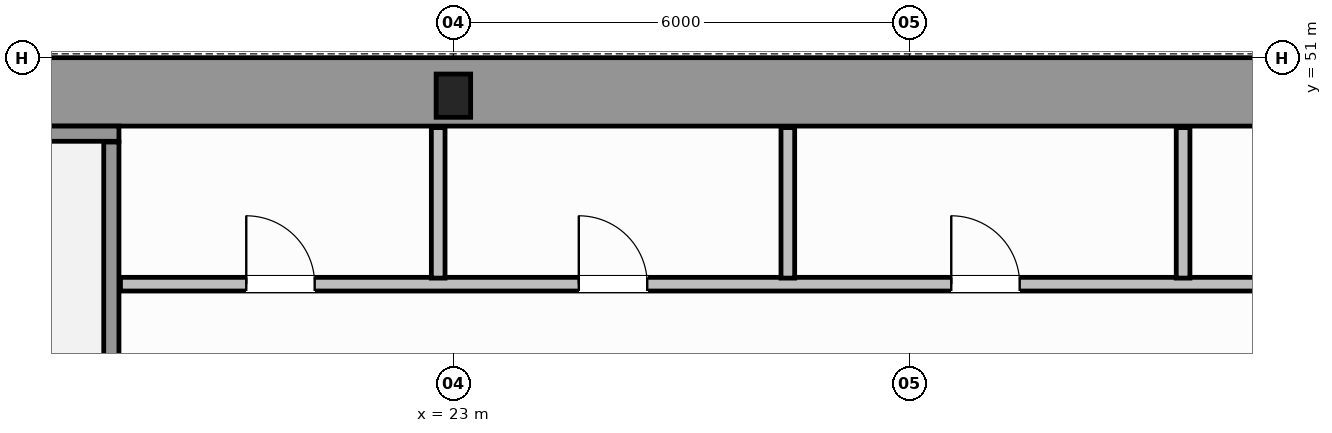
"""IFC4 building model, lengths in metres.
Left out: names, types, materials, properties, quantities, classifications, styles, units other than length and angle.
Written with IfcOpenShell. Run it as: python <this file> out.ifc"""

import sys

from ifc_helpers import new_model, si_unit, direction, frame, frame_2d, origin, origin_2d, place, context, subcontext, project, spatial, rectangle, i_section, extrude, source, transform, mapped, element, fill, save


model = new_model("IFC4")
c1 = context("Model", 3, precision=1e-05, world=origin(), true_north=direction((0.0, 1.0)))
c2 = subcontext(c1, "Body", "Model", "MODEL_VIEW")
j1 = project(units=[si_unit("LENGTHUNIT", "METRE"), si_unit("PLANEANGLEUNIT", "RADIAN")], contexts=[c1])
p1 = place(None, origin())
s1 = spatial("IfcSite", under=j1, at=p1, CompositionType="ELEMENT")
p2 = place(p1, origin())
s2 = spatial("IfcBuilding", under=s1, at=p2, CompositionType="ELEMENT")
p3 = place(p2, frame((0.0, 0.0, 49.2)))
s3 = spatial("IfcBuildingStorey", under=s2, at=p3, CompositionType="ELEMENT", Elevation=49.2)
m1 = source(origin(), c2, "Body", "SweptSolid", [
    extrude(i_section(OverallWidth=0.454, OverallDepth=0.569, WebThickness=0.078, FlangeThickness=0.08, FilletRadius=0.015, at=origin_2d()), origin(), (0.0, 0.0, 1.0), 3.8),
])
p4 = place(p3, frame((23.0, 50.5, 0.0), z_axis=(0.0, 0.0, 1.0), x_axis=(1.0, 0.0, 0.0)))
e1 = element("IfcColumn", 1, at=p4, inside=s3, PredefinedType="COLUMN", context=c2, shape_type="MappedRepresentation", body=[
    mapped(m1, transform((0.0, 0.0, 0.0), scale=1.0)),
])
p5 = place(p3, frame((14.454, 50.55, 0.0), z_axis=(0.0, 0.0, 1.0), x_axis=(1.0, 0.0, 0.0)))
e2 = element("IfcWall", 2, at=p5, inside=s3, PredefinedType="SHEAR", context=c2, shape_type="SweptSolid", body=[
    extrude(rectangle(XDim=19.544, YDim=0.9, at=frame_2d((9.772, 0.0))), origin(), (0.0, 0.0, 1.0), 3.8),
])
p6 = place(p3, frame((14.45, 50.0, 0.0), z_axis=(0.0, 0.0, 1.0), x_axis=(1.0, 0.0, 0.0)))
e3 = element("IfcWall", 3, at=p6, inside=s3, PredefinedType="SOLIDWALL", context=c2, shape_type="SweptSolid", body=[
    extrude(rectangle(XDim=4.15, YDim=0.2, at=frame_2d((2.075, 0.0))), origin(), (0.0, 0.0, 1.0), 3.8),
])
p7 = place(p3, frame((18.5, 39.96, 0.0), z_axis=(0.0, 0.0, 1.0), x_axis=(0.0, 1.0, 0.0)))
e4 = element("IfcWall", 4, at=p7, inside=s3, PredefinedType="SOLIDWALL", context=c2, shape_type="SweptSolid", body=[
    extrude(rectangle(XDim=9.93, YDim=0.2, at=frame_2d((4.965, 0.0))), origin(), (0.0, 0.0, 1.0), 3.8),
])
p8 = place(p3, frame((18.62, 48.02, 0.0), z_axis=(0.0, 0.0, 1.0), x_axis=(1.0, 0.0, 0.0)))
e5 = element("IfcWall", 5, at=p8, inside=s3, PredefinedType="PLUMBINGWALL", context=c2, shape_type="SweptSolid", body=[
    extrude(rectangle(XDim=30.76, YDim=0.18, at=frame_2d((15.38, 0.0))), origin(), (0.0, 0.0, 1.0), 3.58),
])
p9 = place(p8, frame((1.655, 0.0, 0.0)))
e6 = element("IfcOpeningElement", 6, at=p9, cuts=e5, PredefinedType="OPENING", context=c2, shape_type="SweptSolid", body=[
    extrude(rectangle(XDim=0.9, YDim=2.15, at=frame_2d((0.45, 1.075))), frame((0.0, 0.1, 0.0), z_axis=(0.0, -1.0, 0.0), x_axis=(1.0, 0.0, 0.0)), (0.0, 0.0, 1.0), 0.2),
])
p10 = place(p8, frame((6.03, 0.0, 0.0)))
e7 = element("IfcOpeningElement", 7, at=p10, cuts=e5, PredefinedType="OPENING", context=c2, shape_type="SweptSolid", body=[
    extrude(rectangle(XDim=0.9, YDim=2.15, at=frame_2d((0.45, 1.075))), frame((0.0, 0.1, 0.0), z_axis=(0.0, -1.0, 0.0), x_axis=(1.0, 0.0, 0.0)), (0.0, 0.0, 1.0), 0.2),
])
p11 = place(p8, frame((10.93, 0.0, 0.0)))
e8 = element("IfcOpeningElement", 8, at=p11, cuts=e5, PredefinedType="OPENING", context=c2, shape_type="SweptSolid", body=[
    extrude(rectangle(XDim=0.9, YDim=2.15, at=frame_2d((0.45, 1.075))), frame((0.0, 0.1, 0.0), z_axis=(0.0, -1.0, 0.0), x_axis=(1.0, 0.0, 0.0)), (0.0, 0.0, 1.0), 0.2),
])
p12 = place(p8, frame((16.13, 0.0, 0.0)))
e9 = element("IfcOpeningElement", 9, at=p12, cuts=e5, PredefinedType="OPENING", context=c2, shape_type="SweptSolid", body=[
    extrude(rectangle(XDim=0.9, YDim=2.15, at=frame_2d((0.45, 1.075))), frame((0.0, 0.1, 0.0), z_axis=(0.0, -1.0, 0.0), x_axis=(1.0, 0.0, 0.0)), (0.0, 0.0, 1.0), 0.2),
])
p13 = place(p8, frame((21.73, 0.0, 0.0)))
e10 = element("IfcOpeningElement", 10, at=p13, cuts=e5, PredefinedType="OPENING", context=c2, shape_type="SweptSolid", body=[
    extrude(rectangle(XDim=0.9, YDim=2.15, at=frame_2d((0.45, 1.075))), frame((0.0, 0.1, 0.0), z_axis=(0.0, -1.0, 0.0), x_axis=(1.0, 0.0, 0.0)), (0.0, 0.0, 1.0), 0.2),
])
p14 = place(p8, frame((27.505, 0.0, 0.0)))
e11 = element("IfcOpeningElement", 11, at=p14, cuts=e5, PredefinedType="OPENING", context=c2, shape_type="SweptSolid", body=[
    extrude(rectangle(XDim=0.9, YDim=2.15, at=frame_2d((0.45, 1.075))), frame((0.0, 0.1, 0.0), z_axis=(0.0, -1.0, 0.0), x_axis=(1.0, 0.0, 0.0)), (0.0, 0.0, 1.0), 0.2),
])
p15 = place(p3, frame((22.8, 48.1, 0.0), z_axis=(0.0, 0.0, 1.0), x_axis=(0.0, 1.0, 0.0)))
e12 = element("IfcWall", 12, at=p15, inside=s3, PredefinedType="PLUMBINGWALL", context=c2, shape_type="SweptSolid", body=[
    extrude(rectangle(XDim=1.98, YDim=0.18, at=frame_2d((0.99, 0.0))), origin(), (0.0, 0.0, 1.0), 2.77),
])
for number, where, z_axis, x_axis in (
    (13, (27.4, 48.1, 0.0), (0.0, 0.0, 1.0), (0.0, 1.0, 0.0)),
    (14, (32.6, 48.1, 0.0), (0.0, 0.0, 1.0), (0.0, 1.0, 0.0)),
):
    element("IfcWall", number, at=place(p3, frame(where, z_axis=z_axis, x_axis=x_axis)), inside=s3, PredefinedType="PLUMBINGWALL", context=c2, shape_type="SweptSolid", body=[
        extrude(rectangle(XDim=1.98, YDim=0.18, at=frame_2d((0.99, 0.0))), origin(), (0.0, 0.0, 1.0), 3.58),
    ])
m2 = source(origin(), c2, "Body", "SweptSolid", [
    extrude(rectangle(XDim=0.9, YDim=2.15, at=frame_2d((0.45, 1.075))), frame((0.0, 0.025, 0.0), z_axis=(0.0, -1.0, 0.0), x_axis=(1.0, 0.0, 0.0)), (0.0, 0.0, 1.0), 0.05),
])
p16 = place(p9, origin())
e15 = element("IfcDoor", 15, at=p16, inside=s3, OperationType="SINGLE_SWING_LEFT", PredefinedType="DOOR", context=c2, shape_type="MappedRepresentation", body=[
    mapped(m2, transform((0.0, 0.0, 0.0), scale=1.0)),
])
fill(e6, e15)
p17 = place(p10, origin())
e16 = element("IfcDoor", 16, at=p17, inside=s3, OperationType="SINGLE_SWING_RIGHT", PredefinedType="DOOR", context=c2, shape_type="MappedRepresentation", body=[
    mapped(m2, transform((0.0, 0.0, 0.0), scale=1.0)),
])
fill(e7, e16)
p18 = place(p11, origin())
e17 = element("IfcDoor", 17, at=p18, inside=s3, OperationType="SINGLE_SWING_LEFT", PredefinedType="DOOR", context=c2, shape_type="MappedRepresentation", body=[
    mapped(m2, transform((0.0, 0.0, 0.0), scale=1.0)),
])
fill(e8, e17)
save(model, sys.argv[1])
